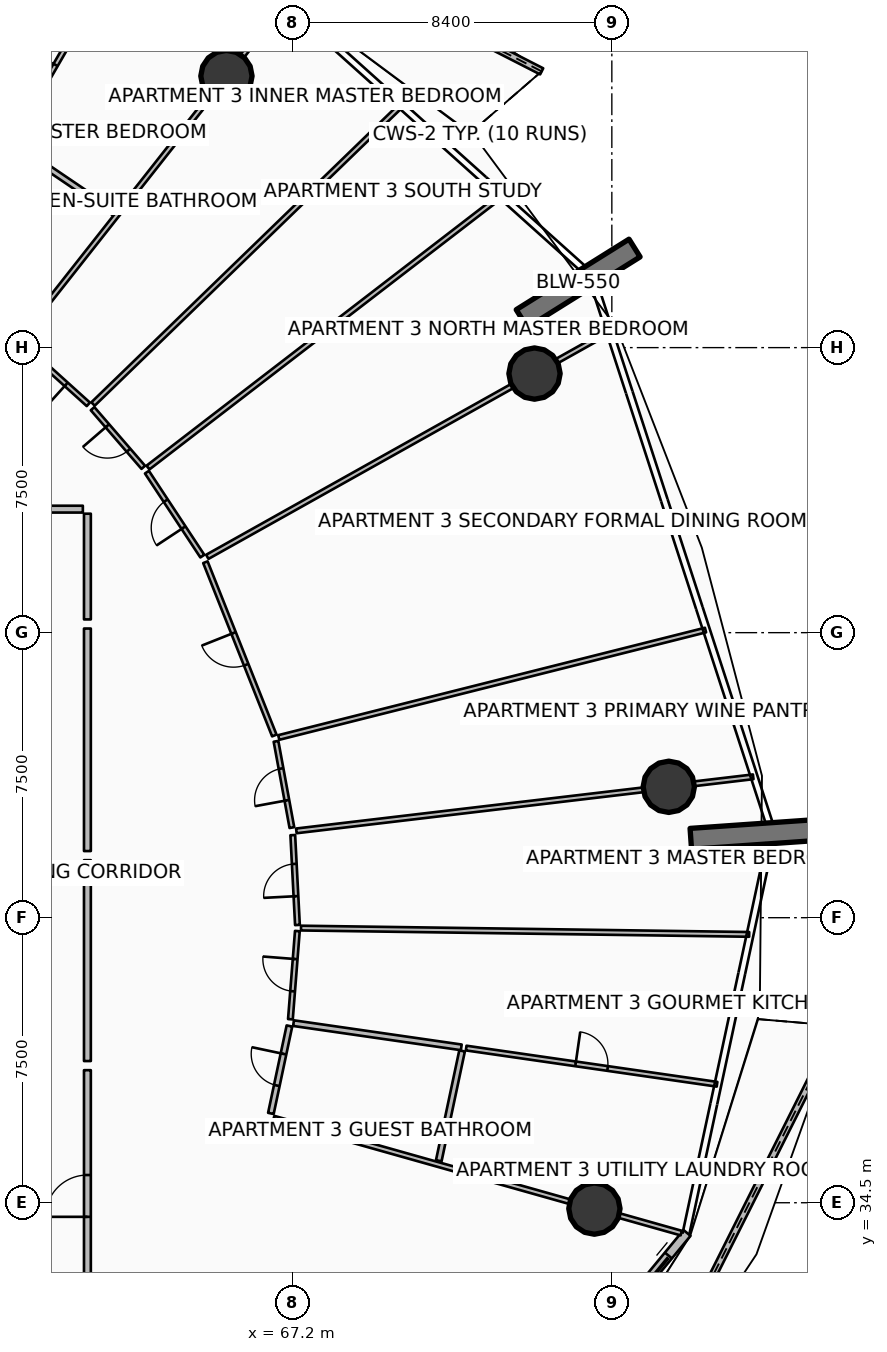
"""IFC4 building model, lengths in metres.
Left out: names, types, materials, properties, quantities, classifications, styles, units other than length and angle.
Written with IfcOpenShell. Run it as: python <this file> out.ifc"""

import sys

from ifc_helpers import new_model, si_unit, direction, frame, frame_2d, origin, origin_2d, place, context, subcontext, project, spatial, polyline, rectangle, circle, outline, extrude, element, fill, save


model = new_model("IFC4")
c1 = context("Model", 3, precision=1e-05, world=origin(), true_north=direction((0.0, 1.0)))
c2 = subcontext(c1, "Body", "Model", "MODEL_VIEW")
j1 = project(units=[si_unit("LENGTHUNIT", "METRE"), si_unit("PLANEANGLEUNIT", "RADIAN")], contexts=[c1])
p1 = place(None, origin())
s1 = spatial("IfcSite", under=j1, at=p1, CompositionType="ELEMENT")
p2 = place(p1, origin())
s2 = spatial("IfcBuilding", under=s1, at=p2, CompositionType="ELEMENT")
p3 = place(p2, frame((0.0, 0.0, 48.9)))
s3 = spatial("IfcBuildingStorey", under=s2, at=p3, CompositionType="ELEMENT", Elevation=48.9)
for number, where, z_axis, x_axis in (
    (1, (73.23, 57.765, 0.0), (0.0, 0.0, 1.0), (0.848, 0.53, 0.0)),
    (2, (77.678, 44.075, 0.0), (0.0, 0.0, 1.0), (0.998, 0.07, 0.0)),
):
    element("IfcWall", number, at=place(p3, frame(where, z_axis=z_axis, x_axis=x_axis)), inside=s3, PredefinedType="SOLIDWALL", context=c2, shape_type="SweptSolid", body=[
        extrude(rectangle(XDim=3.5, YDim=0.55, at=frame_2d((1.75, 0.0))), origin(), (0.0, 0.0, 1.0), 3.75),
    ])
for number, where, z_axis, x_axis in (
    (3, (73.565, 56.317, 0.0), (0.0, 0.0, 1.0), (1.0, 0.0, 0.0)),
    (4, (65.458, 64.146, 0.0), (0.0, 0.0, 1.0), (1.0, 0.0, 0.0)),
    (5, (75.141, 34.345, 0.0), (0.0, 0.0, 1.0), (1.0, 0.0, 0.0)),
    (6, (77.098, 45.444, 0.0), (0.0, 0.0, 1.0), (1.0, 0.0, 0.0)),
):
    element("IfcColumn", number, at=place(p3, frame(where, z_axis=z_axis, x_axis=x_axis)), inside=s3, PredefinedType="COLUMN", context=c2, shape_type="SweptSolid", body=[
        extrude(circle(Radius=0.675, at=origin_2d()), origin(), (0.0, 0.0, 1.0), 3.5),
    ])
p4 = place(p3, frame((73.754, 64.269, 0.0), z_axis=(0.0, 0.0, 1.0), x_axis=(-0.890402176463, 0.455174652359, 0.0)))
e7 = element("IfcWall", 7, at=p4, inside=s3, PredefinedType="PARAPET", context=c2, shape_type="SweptSolid", body=[
    extrude(outline(polyline([(0.0, 0.0), (12.717, 0.0), (12.717, 1.348), (6.358, 1.562), (0.0, 1.747), (0.0, 0.0)])), frame((0.0, 0.09, 0.0), z_axis=(0.0, -1.0, 0.0), x_axis=(1.0, 0.0, 0.0)), (0.0, 0.0, 1.0), 0.18),
])
p5 = place(p3, frame((75.915, 27.911, 0.0), z_axis=(0.0, 0.0, 1.0), x_axis=(0.448439969312, 0.893812952425, 0.0)))
e8 = element("IfcWall", 8, at=p5, inside=s3, PredefinedType="PARAPET", context=c2, shape_type="SweptSolid", body=[
    extrude(outline(polyline([(0.0, 0.0), (12.577, 0.0), (12.577, 1.483), (6.289, 1.284), (0.0, 1.148), (0.0, 0.0)])), frame((0.0, 0.09, 0.0), z_axis=(0.0, -1.0, 0.0), x_axis=(1.0, 0.0, 0.0)), (0.0, 0.0, 1.0), 0.18),
])
p6 = place(p3, frame((70.033, 24.567, 0.0), z_axis=(0.0, 0.0, 1.0), x_axis=(0.636674332663, 0.771132799281, 0.0)))
e9 = element("IfcWall", 9, at=p6, inside=s3, PredefinedType="SOLIDWALL", context=c2, shape_type="SweptSolid", body=[
    extrude(rectangle(XDim=11.851, YDim=0.24, at=frame_2d((5.926, 0.0))), origin(), (0.0, 0.0, 1.0), 2.45),
])
p7 = place(p6, frame((9.631, 0.0, 0.0)))
e10 = element("IfcOpeningElement", 10, at=p7, cuts=e9, PredefinedType="OPENING", context=c2, shape_type="SweptSolid", body=[
    extrude(rectangle(XDim=1.45, YDim=2.15, at=frame_2d((0.725, 1.075))), frame((0.0, 0.13, 0.0), z_axis=(0.0, -1.0, 0.0), x_axis=(1.0, 0.0, 0.0)), (0.0, 0.0, 1.0), 0.26),
])
p8 = place(p6, frame((0.28, 0.0, 0.65)))
e11 = element("IfcOpeningElement", 11, at=p8, cuts=e9, PredefinedType="OPENING", context=c2, shape_type="SweptSolid", body=[
    extrude(rectangle(XDim=1.6, YDim=1.5, at=frame_2d((0.8, 0.75))), frame((0.0, 0.13, 0.0), z_axis=(0.0, -1.0, 0.0), x_axis=(1.0, 0.0, 0.0)), (0.0, 0.0, 1.0), 0.26),
])
p9 = place(p3, frame((61.8, 31.37, 0.0), z_axis=(0.0, 0.0, 1.0), x_axis=(0.0, 1.0, 0.0)))
e12 = element("IfcWall", 12, at=p9, inside=s3, PredefinedType="PARTITIONING", context=c2, shape_type="SweptSolid", body=[
    extrude(rectangle(XDim=6.618, YDim=0.18, at=frame_2d((3.309, 0.0))), origin(), (0.0, 0.0, 1.0), 2.867),
])
p10 = place(p9, frame((2.759, 0.0, 0.0)))
e13 = element("IfcOpeningElement", 13, at=p10, cuts=e12, PredefinedType="OPENING", context=c2, shape_type="SweptSolid", body=[
    extrude(rectangle(XDim=1.1, YDim=2.1, at=frame_2d((0.55, 1.05))), frame((0.0, 0.1, 0.0), z_axis=(0.0, -1.0, 0.0), x_axis=(1.0, 0.0, 0.0)), (0.0, 0.0, 1.0), 0.2),
])
p11 = place(p3, frame((61.8, 38.228, 0.0), z_axis=(0.0, 0.0, 1.0), x_axis=(0.0, 1.0, 0.0)))
e14 = element("IfcWall", 14, at=p11, inside=s3, PredefinedType="PARTITIONING", context=c2, shape_type="SweptSolid", body=[
    extrude(rectangle(XDim=5.285, YDim=0.18, at=frame_2d((2.643, 0.0))), origin(), (0.0, 0.0, 1.0), 2.867),
])
p12 = place(p3, frame((66.703, 36.725, 0.0), z_axis=(0.0, 0.0, 1.0), x_axis=(0.962456868727, -0.271434662195, 0.0)))
e15 = element("IfcWall", 15, at=p12, inside=s3, PredefinedType="PARTITIONING", context=c2, shape_type="SweptSolid", body=[
    extrude(rectangle(XDim=11.141, YDim=0.125, at=frame_2d((5.571, 0.0))), origin(), (0.0, 0.0, 1.0), 2.867),
])
p13 = place(p3, frame((66.628, 36.85, 0.0), z_axis=(0.0, 0.0, 1.0), x_axis=(0.207543347309, 0.978225822082, 0.0)))
e16 = element("IfcWall", 16, at=p13, inside=s3, PredefinedType="PARTITIONING", context=c2, shape_type="SweptSolid", body=[
    extrude(rectangle(XDim=2.352, YDim=0.15, at=frame_2d((1.176, 0.0))), origin(), (0.0, 0.0, 1.0), 2.867),
])
p14 = place(p13, frame((0.751, 0.0, 0.0)))
e17 = element("IfcOpeningElement", 17, at=p14, cuts=e16, PredefinedType="OPENING", context=c2, shape_type="SweptSolid", body=[
    extrude(rectangle(XDim=0.85, YDim=2.06, at=frame_2d((0.425, 1.03))), frame((0.0, 0.085, 0.0), z_axis=(0.0, -1.0, 0.0), x_axis=(1.0, 0.0, 0.0)), (0.0, 0.0, 1.0), 0.17),
])
p15 = place(p3, frame((71.046, 35.604, 0.0), z_axis=(0.0, 0.0, 1.0), x_axis=(0.207542541756, 0.97822599299, 0.0)))
e18 = element("IfcWall", 18, at=p15, inside=s3, PredefinedType="PARTITIONING", context=c2, shape_type="SweptSolid", body=[
    extrude(rectangle(XDim=2.955, YDim=0.15, at=frame_2d((1.478, 0.0))), origin(), (0.0, 0.0, 1.0), 2.867),
])
p16 = place(p3, frame((67.224, 39.226, 0.0), z_axis=(0.0, 0.0, 1.0), x_axis=(0.989741519473, -0.142869607092, 0.0)))
e19 = element("IfcWall", 19, at=p16, inside=s3, PredefinedType="PARTITIONING", context=c2, shape_type="SweptSolid", body=[
    extrude(rectangle(XDim=4.46, YDim=0.15, at=frame_2d((2.23, 0.0))), origin(), (0.0, 0.0, 1.0), 2.94),
])
p17 = place(p3, frame((71.767, 38.57, 0.0), z_axis=(0.0, 0.0, 1.0), x_axis=(0.989747166196, -0.142830483468, 0.0)))
e20 = element("IfcWall", 20, at=p17, inside=s3, PredefinedType="PARTITIONING", context=c2, shape_type="SweptSolid", body=[
    extrude(rectangle(XDim=6.67, YDim=0.125, at=frame_2d((3.335, 0.0))), origin(), (0.0, 0.0, 1.0), 2.94),
])
p18 = place(p17, frame((2.91, 0.0, 0.0)))
e21 = element("IfcOpeningElement", 21, at=p18, cuts=e20, PredefinedType="OPENING", context=c2, shape_type="SweptSolid", body=[
    extrude(rectangle(XDim=0.85, YDim=2.06, at=frame_2d((0.425, 1.03))), frame((0.0, 0.073, 0.0), z_axis=(0.0, -1.0, 0.0), x_axis=(1.0, 0.0, 0.0)), (0.0, 0.0, 1.0), 0.145),
])
p19 = place(p3, frame((67.421, 41.727, 0.0), z_axis=(0.0, 0.0, 1.0), x_axis=(0.999900926594, -0.014076114402, 0.0)))
e22 = element("IfcWall", 22, at=p19, inside=s3, PredefinedType="PARTITIONING", context=c2, shape_type="SweptSolid", body=[
    extrude(rectangle(XDim=11.794, YDim=0.125, at=frame_2d((5.897, 0.0))), origin(), (0.0, 0.0, 1.0), 2.94),
])
p20 = place(p3, frame((67.142, 39.328, 0.0), z_axis=(0.0, 0.0, 1.0), x_axis=(0.078573538032, 0.996908320319, 0.0)))
e23 = element("IfcWall", 23, at=p20, inside=s3, PredefinedType="PARTITIONING", context=c2, shape_type="SweptSolid", body=[
    extrude(rectangle(XDim=2.327, YDim=0.125, at=frame_2d((1.164, 0.0))), origin(), (0.0, 0.0, 1.0), 2.94),
])
p21 = place(p20, frame((0.739, 0.0, 0.0)))
e24 = element("IfcOpeningElement", 24, at=p21, cuts=e23, PredefinedType="OPENING", context=c2, shape_type="SweptSolid", body=[
    extrude(rectangle(XDim=0.85, YDim=2.06, at=frame_2d((0.425, 1.03))), frame((0.0, 0.073, 0.0), z_axis=(0.0, -1.0, 0.0), x_axis=(1.0, 0.0, 0.0)), (0.0, 0.0, 1.0), 0.145),
])
p22 = place(p3, frame((67.327, 41.808, 0.0), z_axis=(0.0, 0.0, 1.0), x_axis=(-0.05186073985, 0.998654326412, 0.0)))
e25 = element("IfcWall", 25, at=p22, inside=s3, PredefinedType="PARTITIONING", context=c2, shape_type="SweptSolid", body=[
    extrude(rectangle(XDim=2.368, YDim=0.125, at=frame_2d((1.184, 0.0))), origin(), (0.0, 0.0, 1.0), 2.867),
])
p23 = place(p22, frame((0.759, 0.0, 0.0)))
e26 = element("IfcOpeningElement", 26, at=p23, cuts=e25, PredefinedType="OPENING", context=c2, shape_type="SweptSolid", body=[
    extrude(rectangle(XDim=0.85, YDim=2.06, at=frame_2d((0.425, 1.03))), frame((0.0, 0.073, 0.0), z_axis=(0.0, -1.0, 0.0), x_axis=(1.0, 0.0, 0.0)), (0.0, 0.0, 1.0), 0.145),
])
p24 = place(p3, frame((61.8, 43.753, 0.0), z_axis=(0.0, 0.0, 1.0), x_axis=(0.0, 1.0, 0.0)))
e27 = element("IfcWall", 27, at=p24, inside=s3, PredefinedType="PARTITIONING", context=c2, shape_type="SweptSolid", body=[
    extrude(rectangle(XDim=5.855, YDim=0.18, at=frame_2d((2.927, 0.0))), origin(), (0.0, 0.0, 1.0), 2.867),
])
p25 = place(p3, frame((67.298, 44.284, 0.0), z_axis=(0.0, 0.0, 1.0), x_axis=(0.993068589749, 0.117536275483, 0.0)))
e28 = element("IfcWall", 28, at=p25, inside=s3, PredefinedType="PARTITIONING", context=c2, shape_type="SweptSolid", body=[
    extrude(rectangle(XDim=12.106, YDim=0.125, at=frame_2d((6.053, 0.0))), origin(), (0.0, 0.0, 1.0), 2.867),
])
p26 = place(p3, frame((66.835, 46.742, 0.0), z_axis=(0.0, 0.0, 1.0), x_axis=(0.96974434054, 0.244122743698, 0.0)))
e29 = element("IfcWall", 29, at=p26, inside=s3, PredefinedType="PARTITIONING", context=c2, shape_type="SweptSolid", body=[
    extrude(rectangle(XDim=11.58, YDim=0.125, at=frame_2d((5.79, 0.0))), origin(), (0.0, 0.0, 1.0), 2.94),
])
p27 = place(p3, frame((67.181, 44.371, 0.0), z_axis=(0.0, 0.0, 1.0), x_axis=(-0.181165121265, 0.98345269273, 0.0)))
e30 = element("IfcWall", 30, at=p27, inside=s3, PredefinedType="PARTITIONING", context=c2, shape_type="SweptSolid", body=[
    extrude(rectangle(XDim=2.308, YDim=0.125, at=frame_2d((1.154, 0.0))), origin(), (0.0, 0.0, 1.0), 2.867),
])
p28 = place(p27, frame((0.729, 0.0, 0.0)))
e31 = element("IfcOpeningElement", 31, at=p28, cuts=e30, PredefinedType="OPENING", context=c2, shape_type="SweptSolid", body=[
    extrude(rectangle(XDim=0.85, YDim=2.06, at=frame_2d((0.425, 1.03))), frame((0.0, 0.073, 0.0), z_axis=(0.0, -1.0, 0.0), x_axis=(1.0, 0.0, 0.0)), (0.0, 0.0, 1.0), 0.145),
])
p29 = place(p3, frame((66.719, 46.794, 0.0), z_axis=(0.0, 0.0, 1.0), x_axis=(-0.369571376039, 0.929202345032, 0.0)))
e32 = element("IfcWall", 32, at=p29, inside=s3, PredefinedType="PARTITIONING", context=c2, shape_type="SweptSolid", body=[
    extrude(rectangle(XDim=4.907, YDim=0.125, at=frame_2d((2.454, 0.0))), origin(), (0.0, 0.0, 1.0), 2.867),
])
p30 = place(p29, frame((2.004, 0.0, 0.0)))
e33 = element("IfcOpeningElement", 33, at=p30, cuts=e32, PredefinedType="OPENING", context=c2, shape_type="SweptSolid", body=[
    extrude(rectangle(XDim=0.9, YDim=2.08, at=frame_2d((0.45, 1.04))), frame((0.0, 0.073, 0.0), z_axis=(0.0, -1.0, 0.0), x_axis=(1.0, 0.0, 0.0)), (0.0, 0.0, 1.0), 0.145),
])
p31 = place(p3, frame((61.8, 49.848, 0.0), z_axis=(0.0, 0.0, 1.0), x_axis=(0.0, 1.0, 0.0)))
e34 = element("IfcWall", 34, at=p31, inside=s3, PredefinedType="PARTITIONING", context=c2, shape_type="SweptSolid", body=[
    extrude(rectangle(XDim=2.781, YDim=0.18, at=frame_2d((1.391, 0.0))), origin(), (0.0, 0.0, 1.0), 2.867),
])
p32 = place(p3, frame((61.68, 52.75, 0.0), z_axis=(0.0, 0.0, 1.0), x_axis=(-1.0, 0.0, 0.0)))
e35 = element("IfcWall", 35, at=p32, inside=s3, PredefinedType="PARTITIONING", context=c2, shape_type="SweptSolid", body=[
    extrude(rectangle(XDim=5.085, YDim=0.18, at=frame_2d((2.543, 0.0))), origin(), (0.0, 0.0, 1.0), 2.867),
])
p33 = place(p3, frame((64.955, 51.495, 0.0), z_axis=(0.0, 0.0, 1.0), x_axis=(0.872499825659, 0.488614422857, 0.0)))
e36 = element("IfcWall", 36, at=p33, inside=s3, PredefinedType="PARTITIONING", context=c2, shape_type="SweptSolid", body=[
    extrude(rectangle(XDim=12.106, YDim=0.125, at=frame_2d((6.053, 0.0))), origin(), (0.0, 0.0, 1.0), 2.867),
])
p34 = place(p3, frame((63.394, 53.844, 0.0), z_axis=(0.0, 0.0, 1.0), x_axis=(0.792561224619, 0.609792345992, 0.0)))
e37 = element("IfcWall", 37, at=p34, inside=s3, PredefinedType="PARTITIONING", context=c2, shape_type="SweptSolid", body=[
    extrude(rectangle(XDim=11.714, YDim=0.125, at=frame_2d((5.857, 0.0))), origin(), (0.0, 0.0, 1.0), 2.94),
])
p35 = place(p3, frame((61.948, 55.517, 0.0), z_axis=(0.0, 0.0, 1.0), x_axis=(0.718127497198, 0.69591155887, 0.0)))
e38 = element("IfcWall", 38, at=p35, inside=s3, PredefinedType="PARTITIONING", context=c2, shape_type="SweptSolid", body=[
    extrude(rectangle(XDim=11.264, YDim=0.125, at=frame_2d((5.632, 0.0))), origin(), (0.0, 0.0, 1.0), 2.94),
])
p36 = place(p3, frame((64.824, 51.513, 0.0), z_axis=(0.0, 0.0, 1.0), x_axis=(-0.550627570513, 0.834751027906, 0.0)))
e39 = element("IfcWall", 39, at=p36, inside=s3, PredefinedType="PARTITIONING", context=c2, shape_type="SweptSolid", body=[
    extrude(rectangle(XDim=2.646, YDim=0.125, at=frame_2d((1.323, 0.0))), origin(), (0.0, 0.0, 1.0), 2.867),
])
p37 = place(p36, frame((0.898, 0.0, 0.0)))
e40 = element("IfcOpeningElement", 40, at=p37, cuts=e39, PredefinedType="OPENING", context=c2, shape_type="SweptSolid", body=[
    extrude(rectangle(XDim=0.85, YDim=2.06, at=frame_2d((0.425, 1.03))), frame((0.0, 0.073, 0.0), z_axis=(0.0, -1.0, 0.0), x_axis=(1.0, 0.0, 0.0)), (0.0, 0.0, 1.0), 0.145),
])
p38 = place(p3, frame((63.27, 53.85, 0.0), z_axis=(0.0, 0.0, 1.0), x_axis=(-0.653978023322, 0.756513545822, 0.0)))
e41 = element("IfcWall", 41, at=p38, inside=s3, PredefinedType="PARTITIONING", context=c2, shape_type="SweptSolid", body=[
    extrude(rectangle(XDim=2.041, YDim=0.125, at=frame_2d((1.02, 0.0))), origin(), (0.0, 0.0, 1.0), 2.94),
])
p39 = place(p38, frame((0.595, 0.0, 0.0)))
e42 = element("IfcOpeningElement", 42, at=p39, cuts=e41, PredefinedType="OPENING", context=c2, shape_type="SweptSolid", body=[
    extrude(rectangle(XDim=0.85, YDim=2.06, at=frame_2d((0.425, 1.03))), frame((0.0, 0.073, 0.0), z_axis=(0.0, -1.0, 0.0), x_axis=(1.0, 0.0, 0.0)), (0.0, 0.0, 1.0), 0.145),
])
p40 = place(p3, frame((61.824, 55.508, 0.0), z_axis=(0.0, 0.0, 1.0), x_axis=(-0.742309867555, 0.670056759185, 0.0)))
e43 = element("IfcWall", 43, at=p40, inside=s3, PredefinedType="PARTITIONING", context=c2, shape_type="SweptSolid", body=[
    extrude(rectangle(XDim=2.419, YDim=0.125, at=frame_2d((1.21, 0.0))), origin(), (0.0, 0.0, 1.0), 2.867),
])
p41 = place(p40, frame((0.785, 0.0, 0.0)))
e44 = element("IfcOpeningElement", 44, at=p41, cuts=e43, PredefinedType="OPENING", context=c2, shape_type="SweptSolid", body=[
    extrude(rectangle(XDim=0.85, YDim=2.06, at=frame_2d((0.425, 1.03))), frame((0.0, 0.073, 0.0), z_axis=(0.0, -1.0, 0.0), x_axis=(1.0, 0.0, 0.0)), (0.0, 0.0, 1.0), 0.145),
])
p42 = place(p3, frame((60.031, 57.261, 0.0), z_axis=(0.0, 0.0, 1.0), x_axis=(0.619090661436, 0.78531952282, 0.0)))
e45 = element("IfcWall", 45, at=p42, inside=s3, PredefinedType="PARTITIONING", context=c2, shape_type="SweptSolid", body=[
    extrude(rectangle(XDim=11.241, YDim=0.125, at=frame_2d((5.621, 0.0))), origin(), (0.0, 0.0, 1.0), 2.867),
])
p43 = place(p3, frame((62.499, 60.553, 0.0), z_axis=(0.0, 0.0, 1.0), x_axis=(-0.827754852397, 0.561089925354, 0.0)))
e46 = element("IfcWall", 46, at=p43, inside=s3, PredefinedType="PARTITIONING", context=c2, shape_type="SweptSolid", body=[
    extrude(rectangle(XDim=3.192, YDim=0.15, at=frame_2d((1.596, 0.0))), origin(), (0.0, 0.0, 1.0), 2.867),
])
p44 = place(p3, frame((59.827, 62.472, 0.0), z_axis=(0.0, 0.0, 1.0), x_axis=(0.500211191889, 0.865903437751, 0.0)))
e47 = element("IfcWall", 47, at=p44, inside=s3, PredefinedType="PARTITIONING", context=c2, shape_type="SweptSolid", body=[
    extrude(rectangle(XDim=5.39, YDim=0.125, at=frame_2d((2.695, 0.0))), origin(), (0.0, 0.0, 1.0), 2.94),
])
p45 = place(p44, frame((2.27, 0.0, 0.0)))
e48 = element("IfcOpeningElement", 48, at=p45, cuts=e47, PredefinedType="OPENING", context=c2, shape_type="SweptSolid", body=[
    extrude(rectangle(XDim=0.85, YDim=2.06, at=frame_2d((0.425, 1.03))), frame((0.0, 0.073, 0.0), z_axis=(0.0, -1.0, 0.0), x_axis=(1.0, 0.0, 0.0)), (0.0, 0.0, 1.0), 0.145),
])
p46 = place(p7, origin())
e49 = element("IfcDoor", 49, at=p46, inside=s3, OperationType="DOUBLE_DOOR_SLIDING", PredefinedType="DOOR", context=c2, shape_type="SweptSolid", body=[
    extrude(rectangle(XDim=1.45, YDim=2.15, at=frame_2d((0.725, 1.075))), frame((0.0, 0.025, 0.0), z_axis=(0.0, -1.0, 0.0), x_axis=(1.0, 0.0, 0.0)), (0.0, 0.0, 1.0), 0.05),
])
fill(e10, e49)
p47 = place(p10, origin())
e50 = element("IfcDoor", 50, at=p47, inside=s3, OperationType="SINGLE_SWING_LEFT", PredefinedType="DOOR", context=c2, shape_type="SweptSolid", body=[
    extrude(rectangle(XDim=1.1, YDim=2.1, at=frame_2d((0.55, 1.05))), frame((0.0, 0.025, 0.0), z_axis=(0.0, -1.0, 0.0), x_axis=(1.0, 0.0, 0.0)), (0.0, 0.0, 1.0), 0.05),
])
fill(e13, e50)
p48 = place(p14, origin())
e51 = element("IfcDoor", 51, at=p48, inside=s3, OperationType="SINGLE_SWING_RIGHT", PredefinedType="DOOR", context=c2, shape_type="SweptSolid", body=[
    extrude(rectangle(XDim=0.85, YDim=2.06, at=frame_2d((0.425, 1.03))), frame((0.0, 0.025, 0.0), z_axis=(0.0, -1.0, 0.0), x_axis=(1.0, 0.0, 0.0)), (0.0, 0.0, 1.0), 0.05),
])
fill(e17, e51)
p49 = place(p18, origin())
e52 = element("IfcDoor", 52, at=p49, inside=s3, OperationType="SINGLE_SWING_LEFT", PredefinedType="DOOR", context=c2, shape_type="SweptSolid", body=[
    extrude(rectangle(XDim=0.85, YDim=2.06, at=frame_2d((0.425, 1.03))), frame((0.0, 0.025, 0.0), z_axis=(0.0, -1.0, 0.0), x_axis=(1.0, 0.0, 0.0)), (0.0, 0.0, 1.0), 0.05),
])
fill(e21, e52)
p50 = place(p21, origin())
e53 = element("IfcDoor", 53, at=p50, inside=s3, OperationType="SINGLE_SWING_RIGHT", PredefinedType="DOOR", context=c2, shape_type="SweptSolid", body=[
    extrude(rectangle(XDim=0.85, YDim=2.06, at=frame_2d((0.425, 1.03))), frame((0.0, 0.025, 0.0), z_axis=(0.0, -1.0, 0.0), x_axis=(1.0, 0.0, 0.0)), (0.0, 0.0, 1.0), 0.05),
])
fill(e24, e53)
p51 = place(p23, origin())
e54 = element("IfcDoor", 54, at=p51, inside=s3, OperationType="SINGLE_SWING_LEFT", PredefinedType="DOOR", context=c2, shape_type="SweptSolid", body=[
    extrude(rectangle(XDim=0.85, YDim=2.06, at=frame_2d((0.425, 1.03))), frame((0.0, 0.025, 0.0), z_axis=(0.0, -1.0, 0.0), x_axis=(1.0, 0.0, 0.0)), (0.0, 0.0, 1.0), 0.05),
])
fill(e26, e54)
p52 = place(p28, origin())
e55 = element("IfcDoor", 55, at=p52, inside=s3, OperationType="SINGLE_SWING_LEFT", PredefinedType="DOOR", context=c2, shape_type="SweptSolid", body=[
    extrude(rectangle(XDim=0.85, YDim=2.06, at=frame_2d((0.425, 1.03))), frame((0.0, 0.025, 0.0), z_axis=(0.0, -1.0, 0.0), x_axis=(1.0, 0.0, 0.0)), (0.0, 0.0, 1.0), 0.05),
])
fill(e31, e55)
p53 = place(p30, origin())
e56 = element("IfcDoor", 56, at=p53, inside=s3, OperationType="SINGLE_SWING_RIGHT", PredefinedType="DOOR", context=c2, shape_type="SweptSolid", body=[
    extrude(rectangle(XDim=0.9, YDim=2.08, at=frame_2d((0.45, 1.04))), frame((0.0, 0.025, 0.0), z_axis=(0.0, -1.0, 0.0), x_axis=(1.0, 0.0, 0.0)), (0.0, 0.0, 1.0), 0.05),
])
fill(e33, e56)
p54 = place(p37, origin())
e57 = element("IfcDoor", 57, at=p54, inside=s3, OperationType="SINGLE_SWING_LEFT", PredefinedType="DOOR", context=c2, shape_type="SweptSolid", body=[
    extrude(rectangle(XDim=0.85, YDim=2.06, at=frame_2d((0.425, 1.03))), frame((0.0, 0.025, 0.0), z_axis=(0.0, -1.0, 0.0), x_axis=(1.0, 0.0, 0.0)), (0.0, 0.0, 1.0), 0.05),
])
fill(e40, e57)
p55 = place(p39, origin())
e58 = element("IfcDoor", 58, at=p55, inside=s3, OperationType="SINGLE_SWING_RIGHT", PredefinedType="DOOR", context=c2, shape_type="SweptSolid", body=[
    extrude(rectangle(XDim=0.85, YDim=2.06, at=frame_2d((0.425, 1.03))), frame((0.0, 0.025, 0.0), z_axis=(0.0, -1.0, 0.0), x_axis=(1.0, 0.0, 0.0)), (0.0, 0.0, 1.0), 0.05),
])
fill(e42, e58)
p56 = place(p41, origin())
e59 = element("IfcDoor", 59, at=p56, inside=s3, OperationType="SINGLE_SWING_LEFT", PredefinedType="DOOR", context=c2, shape_type="SweptSolid", body=[
    extrude(rectangle(XDim=0.85, YDim=2.06, at=frame_2d((0.425, 1.03))), frame((0.0, 0.025, 0.0), z_axis=(0.0, -1.0, 0.0), x_axis=(1.0, 0.0, 0.0)), (0.0, 0.0, 1.0), 0.05),
])
fill(e44, e59)
p57 = place(p45, origin())
e60 = element("IfcDoor", 60, at=p57, inside=s3, OperationType="SINGLE_SWING_RIGHT", PredefinedType="DOOR", context=c2, shape_type="SweptSolid", body=[
    extrude(rectangle(XDim=0.85, YDim=2.06, at=frame_2d((0.425, 1.03))), frame((0.0, 0.025, 0.0), z_axis=(0.0, -1.0, 0.0), x_axis=(1.0, 0.0, 0.0)), (0.0, 0.0, 1.0), 0.05),
])
fill(e48, e60)
save(model, sys.argv[1])
